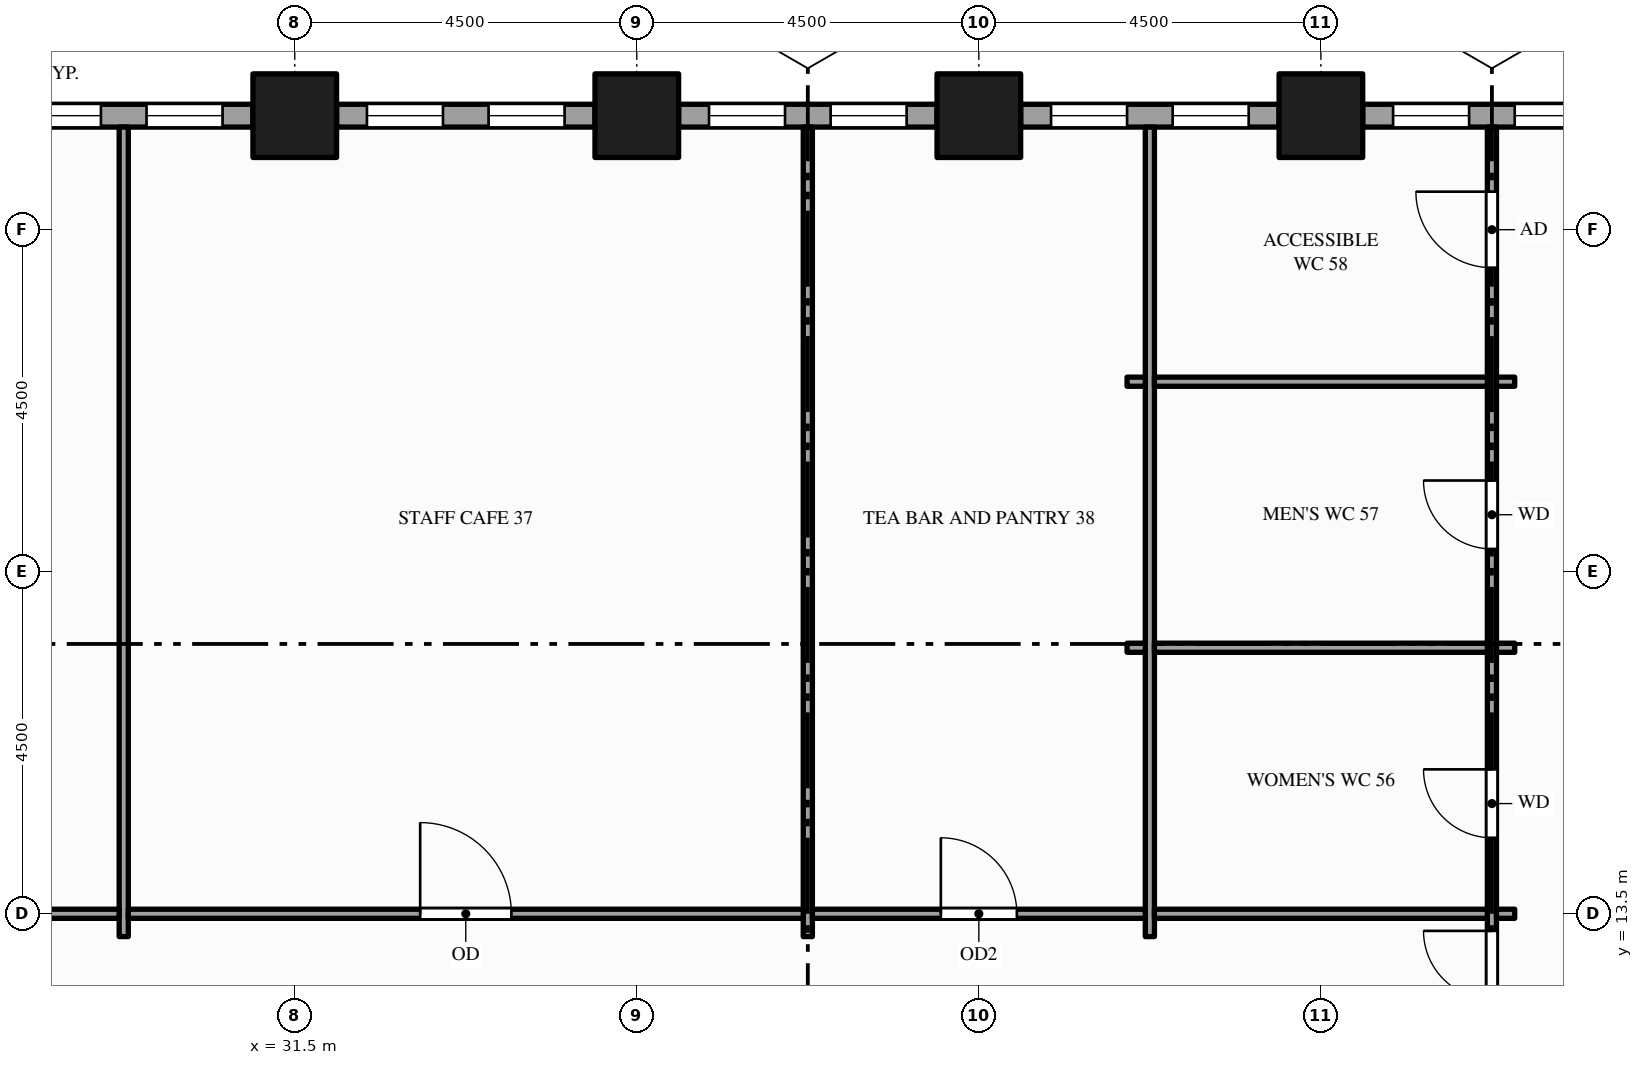
"""IFC4 building model, lengths in metres.
Left out: names, types, materials, properties, quantities, classifications, styles, units other than length and angle.
Written with IfcOpenShell. Run it as: python <this file> out.ifc"""

import sys

from ifc_helpers import new_model, si_unit, direction, frame, frame_2d, origin, origin_2d, place, context, subcontext, project, spatial, rectangle, hollow_rectangle, extrude, element, fill, save


model = new_model("IFC4")
c1 = context("Model", 3, precision=1e-05, world=origin(), true_north=direction((0.0, 1.0)))
c2 = subcontext(c1, "Body", "Model", "MODEL_VIEW")
j1 = project(units=[si_unit("LENGTHUNIT", "METRE"), si_unit("PLANEANGLEUNIT", "RADIAN")], contexts=[c1])
p1 = place(None, origin())
s1 = spatial("IfcSite", under=j1, at=p1, CompositionType="ELEMENT")
p2 = place(p1, origin())
s2 = spatial("IfcBuilding", under=s1, at=p2, CompositionType="ELEMENT")
p3 = place(p2, frame((0.0, 0.0, 41.0)))
s3 = spatial("IfcBuildingStorey", under=s2, at=p3, CompositionType="ELEMENT", Elevation=41.0)
for number, where, z_axis, x_axis in (
    (1, (31.5, 24.0, -0.15), (0.0, 0.0, 1.0), (1.0, 0.0, 0.0)),
    (2, (36.0, 24.0, -0.15), (0.0, 0.0, 1.0), (1.0, 0.0, 0.0)),
    (3, (40.5, 24.0, -0.15), (0.0, 0.0, 1.0), (1.0, 0.0, 0.0)),
    (4, (45.0, 24.0, -0.15), (0.0, 0.0, 1.0), (1.0, 0.0, 0.0)),
):
    element("IfcColumn", number, at=place(p3, frame(where, z_axis=z_axis, x_axis=x_axis)), inside=s3, PredefinedType="COLUMN", context=c2, shape_type="SweptSolid", body=[
        extrude(hollow_rectangle(XDim=1.1, YDim=1.1, WallThickness=0.06, at=origin_2d()), origin(), (0.0, 0.0, 1.0), 4.0),
    ])
p4 = place(p3, frame((48.95, 24.0, 0.0), z_axis=(0.0, 0.0, 1.0), x_axis=(-1.0, 0.0, 0.0)))
e5 = element("IfcWall", 5, at=p4, inside=s3, PredefinedType="STANDARD", context=c2, shape_type="SweptSolid", body=[
    extrude(rectangle(XDim=3.4, YDim=0.3, at=frame_2d((1.7, 0.0))), origin(), (0.0, 0.0, 1.0), 3.144),
])
p5 = place(p4, frame((0.4, 0.0, 0.9)))
e6 = element("IfcOpeningElement", 6, at=p5, cuts=e5, PredefinedType="OPENING", context=c2, shape_type="SweptSolid", body=[
    extrude(rectangle(XDim=1.0, YDim=2.0, at=frame_2d((0.5, 1.0))), frame((0.0, 0.16, 0.0), z_axis=(0.0, -1.0, 0.0), x_axis=(1.0, 0.0, 0.0)), (0.0, 0.0, 1.0), 0.32),
])
p6 = place(p4, frame((2.0, 0.0, 0.9)))
e7 = element("IfcOpeningElement", 7, at=p6, cuts=e5, PredefinedType="OPENING", context=c2, shape_type="SweptSolid", body=[
    extrude(rectangle(XDim=1.0, YDim=2.0, at=frame_2d((0.5, 1.0))), frame((0.0, 0.16, 0.0), z_axis=(0.0, -1.0, 0.0), x_axis=(1.0, 0.0, 0.0)), (0.0, 0.0, 1.0), 0.32),
])
p7 = place(p3, frame((44.45, 24.0, 0.0), z_axis=(0.0, 0.0, 1.0), x_axis=(-1.0, 0.0, 0.0)))
e8 = element("IfcWall", 8, at=p7, inside=s3, PredefinedType="STANDARD", context=c2, shape_type="SweptSolid", body=[
    extrude(rectangle(XDim=3.4, YDim=0.3, at=frame_2d((1.7, 0.0))), origin(), (0.0, 0.0, 1.0), 3.144),
])
p8 = place(p7, frame((0.4, 0.0, 0.9)))
e9 = element("IfcOpeningElement", 9, at=p8, cuts=e8, PredefinedType="OPENING", context=c2, shape_type="SweptSolid", body=[
    extrude(rectangle(XDim=1.0, YDim=2.0, at=frame_2d((0.5, 1.0))), frame((0.0, 0.16, 0.0), z_axis=(0.0, -1.0, 0.0), x_axis=(1.0, 0.0, 0.0)), (0.0, 0.0, 1.0), 0.32),
])
p9 = place(p7, frame((2.0, 0.0, 0.9)))
e10 = element("IfcOpeningElement", 10, at=p9, cuts=e8, PredefinedType="OPENING", context=c2, shape_type="SweptSolid", body=[
    extrude(rectangle(XDim=1.0, YDim=2.0, at=frame_2d((0.5, 1.0))), frame((0.0, 0.16, 0.0), z_axis=(0.0, -1.0, 0.0), x_axis=(1.0, 0.0, 0.0)), (0.0, 0.0, 1.0), 0.32),
])
p10 = place(p3, frame((39.95, 24.0, 0.0), z_axis=(0.0, 0.0, 1.0), x_axis=(-1.0, 0.0, 0.0)))
e11 = element("IfcWall", 11, at=p10, inside=s3, PredefinedType="STANDARD", context=c2, shape_type="SweptSolid", body=[
    extrude(rectangle(XDim=3.4, YDim=0.3, at=frame_2d((1.7, 0.0))), origin(), (0.0, 0.0, 1.0), 3.144),
])
p11 = place(p10, frame((0.4, 0.0, 0.9)))
e12 = element("IfcOpeningElement", 12, at=p11, cuts=e11, PredefinedType="OPENING", context=c2, shape_type="SweptSolid", body=[
    extrude(rectangle(XDim=1.0, YDim=2.0, at=frame_2d((0.5, 1.0))), frame((0.0, 0.16, 0.0), z_axis=(0.0, -1.0, 0.0), x_axis=(1.0, 0.0, 0.0)), (0.0, 0.0, 1.0), 0.32),
])
p12 = place(p10, frame((2.0, 0.0, 0.9)))
e13 = element("IfcOpeningElement", 13, at=p12, cuts=e11, PredefinedType="OPENING", context=c2, shape_type="SweptSolid", body=[
    extrude(rectangle(XDim=1.0, YDim=2.0, at=frame_2d((0.5, 1.0))), frame((0.0, 0.16, 0.0), z_axis=(0.0, -1.0, 0.0), x_axis=(1.0, 0.0, 0.0)), (0.0, 0.0, 1.0), 0.32),
])
p13 = place(p3, frame((35.45, 24.0, 0.0), z_axis=(0.0, 0.0, 1.0), x_axis=(-1.0, 0.0, 0.0)))
e14 = element("IfcWall", 14, at=p13, inside=s3, PredefinedType="STANDARD", context=c2, shape_type="SweptSolid", body=[
    extrude(rectangle(XDim=3.4, YDim=0.3, at=frame_2d((1.7, 0.0))), origin(), (0.0, 0.0, 1.0), 3.144),
])
p14 = place(p13, frame((0.4, 0.0, 0.9)))
e15 = element("IfcOpeningElement", 15, at=p14, cuts=e14, PredefinedType="OPENING", context=c2, shape_type="SweptSolid", body=[
    extrude(rectangle(XDim=1.0, YDim=2.0, at=frame_2d((0.5, 1.0))), frame((0.0, 0.16, 0.0), z_axis=(0.0, -1.0, 0.0), x_axis=(1.0, 0.0, 0.0)), (0.0, 0.0, 1.0), 0.32),
])
p15 = place(p13, frame((2.0, 0.0, 0.9)))
e16 = element("IfcOpeningElement", 16, at=p15, cuts=e14, PredefinedType="OPENING", context=c2, shape_type="SweptSolid", body=[
    extrude(rectangle(XDim=1.0, YDim=2.0, at=frame_2d((0.5, 1.0))), frame((0.0, 0.16, 0.0), z_axis=(0.0, -1.0, 0.0), x_axis=(1.0, 0.0, 0.0)), (0.0, 0.0, 1.0), 0.32),
])
p16 = place(p3, frame((30.95, 24.0, 0.0), z_axis=(0.0, 0.0, 1.0), x_axis=(-1.0, 0.0, 0.0)))
e17 = element("IfcWall", 17, at=p16, inside=s3, PredefinedType="STANDARD", context=c2, shape_type="SweptSolid", body=[
    extrude(rectangle(XDim=4.9, YDim=0.3, at=frame_2d((2.45, 0.0))), origin(), (0.0, 0.0, 1.0), 3.144),
])
p17 = place(p16, frame((0.4, 0.0, 0.9)))
e18 = element("IfcOpeningElement", 18, at=p17, cuts=e17, PredefinedType="OPENING", context=c2, shape_type="SweptSolid", body=[
    extrude(rectangle(XDim=1.0, YDim=2.0, at=frame_2d((0.5, 1.0))), frame((0.0, 0.16, 0.0), z_axis=(0.0, -1.0, 0.0), x_axis=(1.0, 0.0, 0.0)), (0.0, 0.0, 1.0), 0.32),
])
p18 = place(p16, frame((2.0, 0.0, 0.9)))
e19 = element("IfcOpeningElement", 19, at=p18, cuts=e17, PredefinedType="OPENING", context=c2, shape_type="SweptSolid", body=[
    extrude(rectangle(XDim=1.65, YDim=2.0, at=frame_2d((0.825, 1.0))), frame((0.0, 0.16, 0.0), z_axis=(0.0, -1.0, 0.0), x_axis=(1.0, 0.0, 0.0)), (0.0, 0.0, 1.0), 0.32),
])
for number, where, z_axis, x_axis in (
    (20, (29.25, 13.2, 0.0), (0.0, 0.0, 1.0), (0.0, 1.0, 0.0)),
    (21, (38.25, 13.2, 0.0), (0.0, 0.0, 1.0), (0.0, 1.0, 0.0)),
    (22, (42.75, 13.2, 0.0), (0.0, 0.0, 1.0), (0.0, 1.0, 0.0)),
):
    element("IfcWall", number, at=place(p3, frame(where, z_axis=z_axis, x_axis=x_axis)), inside=s3, PredefinedType="PARTITIONING", context=c2, shape_type="SweptSolid", body=[
        extrude(rectangle(XDim=10.65, YDim=0.12, at=frame_2d((5.325, 0.0))), origin(), (0.0, 0.0, 1.0), 2.938),
    ])
p19 = place(p3, frame((47.25, 1.65, 0.0), z_axis=(0.0, 0.0, 1.0), x_axis=(0.0, 1.0, 0.0)))
e23 = element("IfcWall", 23, at=p19, inside=s3, PredefinedType="PARTITIONING", context=c2, shape_type="SweptSolid", body=[
    extrude(rectangle(XDim=22.2, YDim=0.12, at=frame_2d((11.1, 0.0))), origin(), (0.0, 0.0, 1.0), 2.938),
])
p20 = place(p19, frame((9.825, 0.0, 0.0)))
e24 = element("IfcOpeningElement", 24, at=p20, cuts=e23, PredefinedType="OPENING", context=c2, shape_type="SweptSolid", body=[
    extrude(rectangle(XDim=1.8, YDim=2.1, at=frame_2d((0.9, 1.05))), frame((0.0, 0.07, 0.0), z_axis=(0.0, -1.0, 0.0), x_axis=(1.0, 0.0, 0.0)), (0.0, 0.0, 1.0), 0.14),
])
p21 = place(p19, frame((12.85, 0.0, 0.0)))
e25 = element("IfcOpeningElement", 25, at=p21, cuts=e23, PredefinedType="OPENING", context=c2, shape_type="SweptSolid", body=[
    extrude(rectangle(XDim=0.9, YDim=2.1, at=frame_2d((0.45, 1.05))), frame((0.0, 0.07, 0.0), z_axis=(0.0, -1.0, 0.0), x_axis=(1.0, 0.0, 0.0)), (0.0, 0.0, 1.0), 0.14),
])
p22 = place(p19, frame((16.65, 0.0, 0.0)))
e26 = element("IfcOpeningElement", 26, at=p22, cuts=e23, PredefinedType="OPENING", context=c2, shape_type="SweptSolid", body=[
    extrude(rectangle(XDim=0.9, YDim=2.1, at=frame_2d((0.45, 1.05))), frame((0.0, 0.07, 0.0), z_axis=(0.0, -1.0, 0.0), x_axis=(1.0, 0.0, 0.0)), (0.0, 0.0, 1.0), 0.14),
])
p23 = place(p19, frame((20.35, 0.0, 0.0)))
e27 = element("IfcOpeningElement", 27, at=p23, cuts=e23, PredefinedType="OPENING", context=c2, shape_type="SweptSolid", body=[
    extrude(rectangle(XDim=1.0, YDim=2.1, at=frame_2d((0.5, 1.05))), frame((0.0, 0.07, 0.0), z_axis=(0.0, -1.0, 0.0), x_axis=(1.0, 0.0, 0.0)), (0.0, 0.0, 1.0), 0.14),
])
p24 = place(p3, frame((9.06, 13.5, 0.0), z_axis=(0.0, 0.0, 1.0), x_axis=(1.0, 0.0, 0.0)))
e28 = element("IfcWall", 28, at=p24, inside=s3, PredefinedType="PARTITIONING", context=c2, shape_type="SweptSolid", body=[
    extrude(rectangle(XDim=20.13, YDim=0.12, at=frame_2d((10.065, 0.0))), origin(), (0.0, 0.0, 1.0), 2.938),
])
p25 = place(p24, frame((3.54, 0.0, 0.0)))
e29 = element("IfcOpeningElement", 29, at=p25, cuts=e28, PredefinedType="OPENING", context=c2, shape_type="SweptSolid", body=[
    extrude(rectangle(XDim=1.8, YDim=2.1, at=frame_2d((0.9, 1.05))), frame((0.0, 0.07, 0.0), z_axis=(0.0, -1.0, 0.0), x_axis=(1.0, 0.0, 0.0)), (0.0, 0.0, 1.0), 0.14),
])
p26 = place(p3, frame((29.31, 13.5, 0.0), z_axis=(0.0, 0.0, 1.0), x_axis=(1.0, 0.0, 0.0)))
e30 = element("IfcWall", 30, at=p26, inside=s3, PredefinedType="PARTITIONING", context=c2, shape_type="SweptSolid", body=[
    extrude(rectangle(XDim=8.88, YDim=0.12, at=frame_2d((4.44, 0.0))), origin(), (0.0, 0.0, 1.0), 2.938),
])
p27 = place(p26, frame((3.84, 0.0, 0.0)))
e31 = element("IfcOpeningElement", 31, at=p27, cuts=e30, PredefinedType="OPENING", context=c2, shape_type="SweptSolid", body=[
    extrude(rectangle(XDim=1.2, YDim=2.1, at=frame_2d((0.6, 1.05))), frame((0.0, 0.07, 0.0), z_axis=(0.0, -1.0, 0.0), x_axis=(1.0, 0.0, 0.0)), (0.0, 0.0, 1.0), 0.14),
])
p28 = place(p3, frame((38.31, 13.5, 0.0), z_axis=(0.0, 0.0, 1.0), x_axis=(1.0, 0.0, 0.0)))
e32 = element("IfcWall", 32, at=p28, inside=s3, PredefinedType="PARTITIONING", context=c2, shape_type="SweptSolid", body=[
    extrude(rectangle(XDim=4.38, YDim=0.12, at=frame_2d((2.19, 0.0))), origin(), (0.0, 0.0, 1.0), 2.938),
])
p29 = place(p28, frame((1.69, 0.0, 0.0)))
e33 = element("IfcOpeningElement", 33, at=p29, cuts=e32, PredefinedType="OPENING", context=c2, shape_type="SweptSolid", body=[
    extrude(rectangle(XDim=1.0, YDim=2.1, at=frame_2d((0.5, 1.05))), frame((0.0, 0.07, 0.0), z_axis=(0.0, -1.0, 0.0), x_axis=(1.0, 0.0, 0.0)), (0.0, 0.0, 1.0), 0.14),
])
p30 = place(p3, frame((42.81, 13.5, 0.0), z_axis=(0.0, 0.0, 1.0), x_axis=(1.0, 0.0, 0.0)))
e34 = element("IfcWall", 34, at=p30, inside=s3, PredefinedType="PARTITIONING", context=c2, shape_type="SweptSolid", body=[
    extrude(rectangle(XDim=4.38, YDim=0.12, at=frame_2d((2.19, 0.0))), origin(), (0.0, 0.0, 1.0), 2.938),
])
for number, where, z_axis, x_axis in (
    (35, (47.31, 13.5, 0.0), (0.0, 0.0, 1.0), (1.0, 0.0, 0.0)),
    (36, (42.45, 17.0, 0.0), (0.0, 0.0, 1.0), (1.0, 0.0, 0.0)),
):
    element("IfcWall", number, at=place(p3, frame(where, z_axis=z_axis, x_axis=x_axis)), inside=s3, PredefinedType="PARTITIONING", context=c2, shape_type="SweptSolid", body=[
        extrude(rectangle(XDim=0.24, YDim=0.12, at=frame_2d((0.12, 0.0))), origin(), (0.0, 0.0, 1.0), 2.938),
    ])
p31 = place(p3, frame((42.81, 17.0, 0.0), z_axis=(0.0, 0.0, 1.0), x_axis=(1.0, 0.0, 0.0)))
e37 = element("IfcWall", 37, at=p31, inside=s3, PredefinedType="PARTITIONING", context=c2, shape_type="SweptSolid", body=[
    extrude(rectangle(XDim=4.38, YDim=0.12, at=frame_2d((2.19, 0.0))), origin(), (0.0, 0.0, 1.0), 2.938),
])
for number, where, z_axis, x_axis in (
    (38, (47.31, 17.0, 0.0), (0.0, 0.0, 1.0), (1.0, 0.0, 0.0)),
    (39, (42.45, 20.5, 0.0), (0.0, 0.0, 1.0), (1.0, 0.0, 0.0)),
):
    element("IfcWall", number, at=place(p3, frame(where, z_axis=z_axis, x_axis=x_axis)), inside=s3, PredefinedType="PARTITIONING", context=c2, shape_type="SweptSolid", body=[
        extrude(rectangle(XDim=0.24, YDim=0.12, at=frame_2d((0.12, 0.0))), origin(), (0.0, 0.0, 1.0), 2.938),
    ])
p32 = place(p3, frame((42.81, 20.5, 0.0), z_axis=(0.0, 0.0, 1.0), x_axis=(1.0, 0.0, 0.0)))
e40 = element("IfcWall", 40, at=p32, inside=s3, PredefinedType="PARTITIONING", context=c2, shape_type="SweptSolid", body=[
    extrude(rectangle(XDim=4.38, YDim=0.12, at=frame_2d((2.19, 0.0))), origin(), (0.0, 0.0, 1.0), 2.938),
])
p33 = place(p3, frame((47.31, 20.5, 0.0), z_axis=(0.0, 0.0, 1.0), x_axis=(1.0, 0.0, 0.0)))
e41 = element("IfcWall", 41, at=p33, inside=s3, PredefinedType="PARTITIONING", context=c2, shape_type="SweptSolid", body=[
    extrude(rectangle(XDim=0.24, YDim=0.12, at=frame_2d((0.12, 0.0))), origin(), (0.0, 0.0, 1.0), 2.938),
])
p34 = place(p5, origin())
e42 = element("IfcWindow", 42, at=p34, inside=s3, PartitioningType="SINGLE_PANEL", PredefinedType="WINDOW", context=c2, shape_type="SweptSolid", body=[
    extrude(rectangle(XDim=1.0, YDim=2.0, at=frame_2d((0.5, 1.0))), frame((0.0, 0.03, 0.0), z_axis=(0.0, -1.0, 0.0), x_axis=(1.0, 0.0, 0.0)), (0.0, 0.0, 1.0), 0.06),
])
fill(e6, e42)
p35 = place(p6, origin())
e43 = element("IfcWindow", 43, at=p35, inside=s3, PartitioningType="SINGLE_PANEL", PredefinedType="WINDOW", context=c2, shape_type="SweptSolid", body=[
    extrude(rectangle(XDim=1.0, YDim=2.0, at=frame_2d((0.5, 1.0))), frame((0.0, 0.03, 0.0), z_axis=(0.0, -1.0, 0.0), x_axis=(1.0, 0.0, 0.0)), (0.0, 0.0, 1.0), 0.06),
])
fill(e7, e43)
p36 = place(p8, origin())
e44 = element("IfcWindow", 44, at=p36, inside=s3, PartitioningType="SINGLE_PANEL", PredefinedType="WINDOW", context=c2, shape_type="SweptSolid", body=[
    extrude(rectangle(XDim=1.0, YDim=2.0, at=frame_2d((0.5, 1.0))), frame((0.0, 0.03, 0.0), z_axis=(0.0, -1.0, 0.0), x_axis=(1.0, 0.0, 0.0)), (0.0, 0.0, 1.0), 0.06),
])
fill(e9, e44)
p37 = place(p9, origin())
e45 = element("IfcWindow", 45, at=p37, inside=s3, PartitioningType="SINGLE_PANEL", PredefinedType="WINDOW", context=c2, shape_type="SweptSolid", body=[
    extrude(rectangle(XDim=1.0, YDim=2.0, at=frame_2d((0.5, 1.0))), frame((0.0, 0.03, 0.0), z_axis=(0.0, -1.0, 0.0), x_axis=(1.0, 0.0, 0.0)), (0.0, 0.0, 1.0), 0.06),
])
fill(e10, e45)
p38 = place(p11, origin())
e46 = element("IfcWindow", 46, at=p38, inside=s3, PartitioningType="SINGLE_PANEL", PredefinedType="WINDOW", context=c2, shape_type="SweptSolid", body=[
    extrude(rectangle(XDim=1.0, YDim=2.0, at=frame_2d((0.5, 1.0))), frame((0.0, 0.03, 0.0), z_axis=(0.0, -1.0, 0.0), x_axis=(1.0, 0.0, 0.0)), (0.0, 0.0, 1.0), 0.06),
])
fill(e12, e46)
p39 = place(p12, origin())
e47 = element("IfcWindow", 47, at=p39, inside=s3, PartitioningType="SINGLE_PANEL", PredefinedType="WINDOW", context=c2, shape_type="SweptSolid", body=[
    extrude(rectangle(XDim=1.0, YDim=2.0, at=frame_2d((0.5, 1.0))), frame((0.0, 0.03, 0.0), z_axis=(0.0, -1.0, 0.0), x_axis=(1.0, 0.0, 0.0)), (0.0, 0.0, 1.0), 0.06),
])
fill(e13, e47)
p40 = place(p14, origin())
e48 = element("IfcWindow", 48, at=p40, inside=s3, PartitioningType="SINGLE_PANEL", PredefinedType="WINDOW", context=c2, shape_type="SweptSolid", body=[
    extrude(rectangle(XDim=1.0, YDim=2.0, at=frame_2d((0.5, 1.0))), frame((0.0, 0.03, 0.0), z_axis=(0.0, -1.0, 0.0), x_axis=(1.0, 0.0, 0.0)), (0.0, 0.0, 1.0), 0.06),
])
fill(e15, e48)
p41 = place(p15, origin())
e49 = element("IfcWindow", 49, at=p41, inside=s3, PartitioningType="SINGLE_PANEL", PredefinedType="WINDOW", context=c2, shape_type="SweptSolid", body=[
    extrude(rectangle(XDim=1.0, YDim=2.0, at=frame_2d((0.5, 1.0))), frame((0.0, 0.03, 0.0), z_axis=(0.0, -1.0, 0.0), x_axis=(1.0, 0.0, 0.0)), (0.0, 0.0, 1.0), 0.06),
])
fill(e16, e49)
p42 = place(p17, origin())
e50 = element("IfcWindow", 50, at=p42, inside=s3, PartitioningType="SINGLE_PANEL", PredefinedType="WINDOW", context=c2, shape_type="SweptSolid", body=[
    extrude(rectangle(XDim=1.0, YDim=2.0, at=frame_2d((0.5, 1.0))), frame((0.0, 0.03, 0.0), z_axis=(0.0, -1.0, 0.0), x_axis=(1.0, 0.0, 0.0)), (0.0, 0.0, 1.0), 0.06),
])
fill(e18, e50)
p43 = place(p18, origin())
e51 = element("IfcWindow", 51, at=p43, inside=s3, PartitioningType="SINGLE_PANEL", PredefinedType="WINDOW", context=c2, shape_type="SweptSolid", body=[
    extrude(rectangle(XDim=1.65, YDim=2.0, at=frame_2d((0.825, 1.0))), frame((0.0, 0.03, 0.0), z_axis=(0.0, -1.0, 0.0), x_axis=(1.0, 0.0, 0.0)), (0.0, 0.0, 1.0), 0.06),
])
fill(e19, e51)
p44 = place(p20, origin())
e52 = element("IfcDoor", 52, at=p44, inside=s3, OperationType="DOUBLE_DOOR_SINGLE_SWING", PredefinedType="DOOR", context=c2, shape_type="SweptSolid", body=[
    extrude(rectangle(XDim=1.8, YDim=2.1, at=frame_2d((0.9, 1.05))), frame((0.0, 0.025, 0.0), z_axis=(0.0, -1.0, 0.0), x_axis=(1.0, 0.0, 0.0)), (0.0, 0.0, 1.0), 0.05),
])
fill(e24, e52)
p45 = place(p27, origin())
e53 = element("IfcDoor", 53, at=p45, inside=s3, OperationType="SINGLE_SWING_LEFT", PredefinedType="DOOR", context=c2, shape_type="SweptSolid", body=[
    extrude(rectangle(XDim=1.2, YDim=2.1, at=frame_2d((0.6, 1.05))), frame((0.0, 0.025, 0.0), z_axis=(0.0, -1.0, 0.0), x_axis=(1.0, 0.0, 0.0)), (0.0, 0.0, 1.0), 0.05),
])
fill(e31, e53)
p46 = place(p29, origin())
e54 = element("IfcDoor", 54, at=p46, inside=s3, OperationType="SINGLE_SWING_LEFT", PredefinedType="DOOR", context=c2, shape_type="SweptSolid", body=[
    extrude(rectangle(XDim=1.0, YDim=2.1, at=frame_2d((0.5, 1.05))), frame((0.0, 0.025, 0.0), z_axis=(0.0, -1.0, 0.0), x_axis=(1.0, 0.0, 0.0)), (0.0, 0.0, 1.0), 0.05),
])
fill(e33, e54)
p47 = place(p21, origin())
e55 = element("IfcDoor", 55, at=p47, inside=s3, OperationType="SINGLE_SWING_RIGHT", PredefinedType="DOOR", context=c2, shape_type="SweptSolid", body=[
    extrude(rectangle(XDim=0.9, YDim=2.1, at=frame_2d((0.45, 1.05))), frame((0.0, 0.025, 0.0), z_axis=(0.0, -1.0, 0.0), x_axis=(1.0, 0.0, 0.0)), (0.0, 0.0, 1.0), 0.05),
])
fill(e25, e55)
p48 = place(p22, origin())
e56 = element("IfcDoor", 56, at=p48, inside=s3, OperationType="SINGLE_SWING_RIGHT", PredefinedType="DOOR", context=c2, shape_type="SweptSolid", body=[
    extrude(rectangle(XDim=0.9, YDim=2.1, at=frame_2d((0.45, 1.05))), frame((0.0, 0.025, 0.0), z_axis=(0.0, -1.0, 0.0), x_axis=(1.0, 0.0, 0.0)), (0.0, 0.0, 1.0), 0.05),
])
fill(e26, e56)
p49 = place(p23, origin())
e57 = element("IfcDoor", 57, at=p49, inside=s3, OperationType="SINGLE_SWING_RIGHT", PredefinedType="DOOR", context=c2, shape_type="SweptSolid", body=[
    extrude(rectangle(XDim=1.0, YDim=2.1, at=frame_2d((0.5, 1.05))), frame((0.0, 0.025, 0.0), z_axis=(0.0, -1.0, 0.0), x_axis=(1.0, 0.0, 0.0)), (0.0, 0.0, 1.0), 0.05),
])
fill(e27, e57)
save(model, sys.argv[1])
